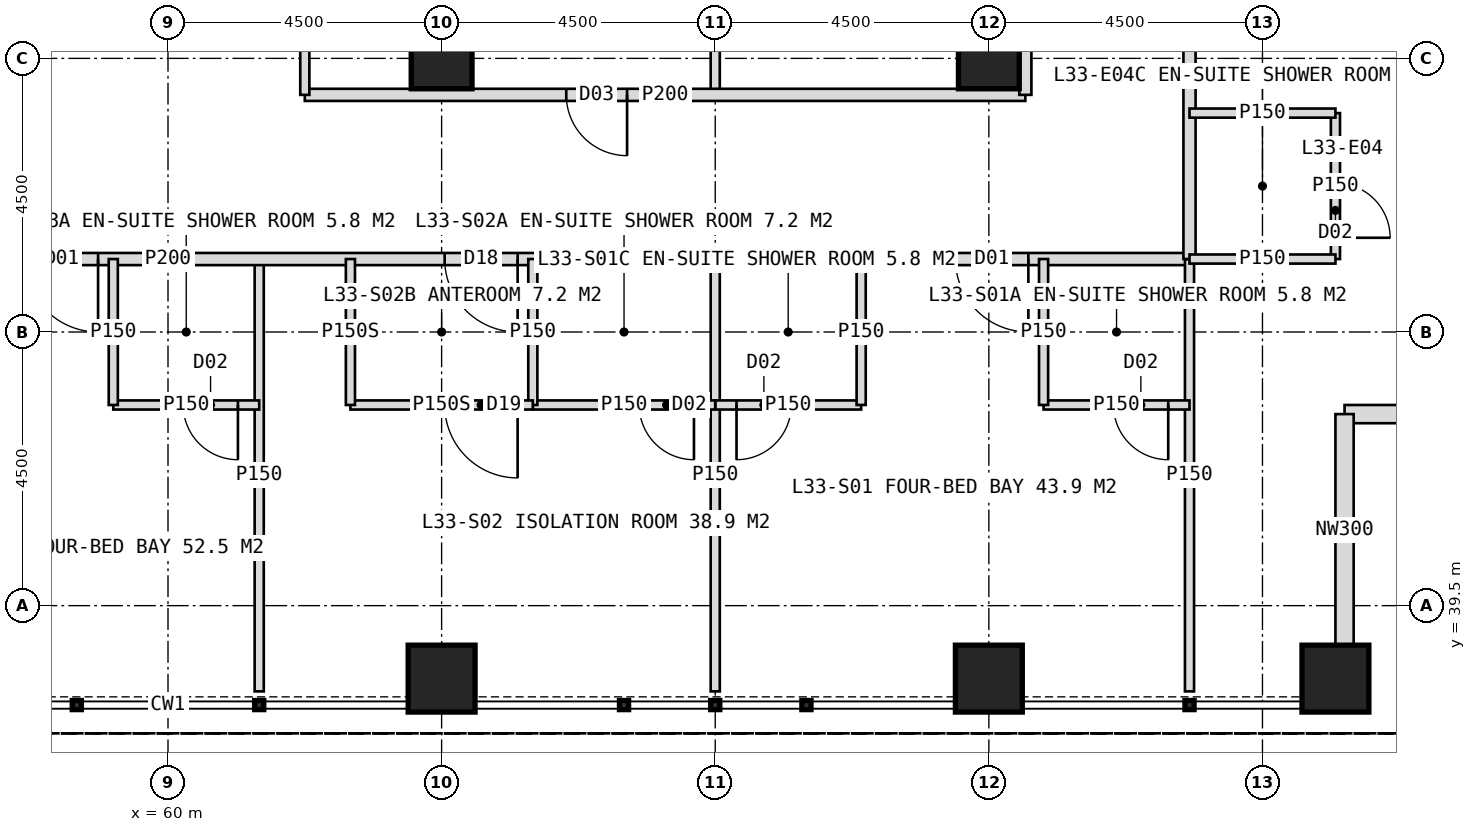
"""IFC4 building model, lengths in metres.
Left out: names, types, materials, properties, quantities, classifications, styles, units other than length and angle.
Written with IfcOpenShell. Run it as: python <this file> out.ifc"""

import sys

from ifc_helpers import new_model, si_unit, direction, frame, frame_2d, origin, origin_2d, place, context, subcontext, project, spatial, rectangle, hollow_rectangle, extrude, element, fill, save


model = new_model("IFC4")
c1 = context("Model", 3, precision=1e-05, world=origin(), true_north=direction((0.0, 1.0)))
c2 = subcontext(c1, "Body", "Model", "MODEL_VIEW")
j1 = project(units=[si_unit("LENGTHUNIT", "METRE"), si_unit("PLANEANGLEUNIT", "RADIAN")], contexts=[c1])
p1 = place(None, origin())
s1 = spatial("IfcSite", under=j1, at=p1, CompositionType="ELEMENT")
p2 = place(p1, origin())
s2 = spatial("IfcBuilding", under=s1, at=p2, CompositionType="ELEMENT")
p3 = place(p2, frame((0.0, 0.0, 140.0)))
s3 = spatial("IfcBuildingStorey", under=s2, at=p3, CompositionType="ELEMENT", Elevation=140.0)
for number, where, z_axis, x_axis in (
    (1, (73.5, 48.5, 0.0), (0.0, 0.0, 1.0), (1.0, 0.0, 0.0)),
    (2, (64.5, 48.5, 0.0), (0.0, 0.0, 1.0), (1.0, 0.0, 0.0)),
):
    element("IfcColumn", number, at=place(p3, frame(where, z_axis=z_axis, x_axis=x_axis)), inside=s3, PredefinedType="COLUMN", context=c2, shape_type="SweptSolid", body=[
        extrude(hollow_rectangle(XDim=1.0, YDim=1.0, WallThickness=0.1, at=origin_2d()), origin(), (0.0, 0.0, 1.0), 4.0),
    ])
for number, where, z_axis, x_axis in (
    (3, (64.5, 38.3, 0.0), (0.0, 0.0, 1.0), (1.0, 0.0, 0.0)),
    (4, (73.5, 38.3, 0.0), (0.0, 0.0, 1.0), (1.0, 0.0, 0.0)),
    (5, (79.2, 38.3, 0.0), (0.0, 0.0, 1.0), (1.0, 0.0, 0.0)),
):
    element("IfcColumn", number, at=place(p3, frame(where, z_axis=z_axis, x_axis=x_axis)), inside=s3, PredefinedType="COLUMN", context=c2, shape_type="SweptSolid", body=[
        extrude(hollow_rectangle(XDim=1.1, YDim=1.1, WallThickness=0.1, at=origin_2d()), origin(), (0.0, 0.0, 1.0), 4.0),
    ])
for number, where, z_axis, x_axis in (
    (6, (83.15, 42.65, 0.0), (0.0, 0.0, 1.0), (-1.0, 0.0, 0.0)),
    (7, (79.35, 42.65, 0.0), (0.0, 0.0, 1.0), (0.0, -1.0, 0.0)),
):
    element("IfcWall", number, at=place(p3, frame(where, z_axis=z_axis, x_axis=x_axis)), inside=s3, PredefinedType="ELEMENTEDWALL", context=c2, shape_type="SweptSolid", body=[
        extrude(rectangle(XDim=3.8, YDim=0.3, at=frame_2d((1.9, 0.0))), origin(), (0.0, 0.0, 1.0), 4.0),
    ])
for number, where, z_axis, x_axis in (
    (8, (69.0, 45.2, 0.0), (0.0, 0.0, 1.0), (0.0, -1.0, 0.0)),
    (9, (61.5, 45.2, 0.0), (0.0, 0.0, 1.0), (0.0, -1.0, 0.0)),
):
    element("IfcWall", number, at=place(p3, frame(where, z_axis=z_axis, x_axis=x_axis)), inside=s3, PredefinedType="PARTITIONING", context=c2, shape_type="SweptSolid", body=[
        extrude(rectangle(XDim=7.11, YDim=0.15, at=frame_2d((3.555, 0.0))), origin(), (0.0, 0.0, 1.0), 3.75),
    ])
p4 = place(p3, frame((76.8, 45.2, 0.0), z_axis=(0.0, 0.0, 1.0), x_axis=(-1.0, 0.0, 0.0)))
e10 = element("IfcWall", 10, at=p4, inside=s3, PredefinedType="PARTITIONING", context=c2, shape_type="SweptSolid", body=[
    extrude(rectangle(XDim=33.6, YDim=0.2, at=frame_2d((16.8, 0.0))), origin(), (0.0, 0.0, 1.0), 3.75),
])
p5 = place(p4, frame((2.65, 0.0, 0.0)))
e11 = element("IfcOpeningElement", 11, at=p5, cuts=e10, PredefinedType="OPENING", context=c2, shape_type="SweptSolid", body=[
    extrude(rectangle(XDim=1.2, YDim=2.2, at=frame_2d((0.6, 1.1))), frame((0.0, 0.11, 0.0), z_axis=(0.0, -1.0, 0.0), x_axis=(1.0, 0.0, 0.0)), (0.0, 0.0, 1.0), 0.22),
])
p6 = place(p4, frame((11.05, 0.0, 0.0)))
e12 = element("IfcOpeningElement", 12, at=p6, cuts=e10, PredefinedType="OPENING", context=c2, shape_type="SweptSolid", body=[
    extrude(rectangle(XDim=1.2, YDim=2.2, at=frame_2d((0.6, 1.1))), frame((0.0, 0.11, 0.0), z_axis=(0.0, -1.0, 0.0), x_axis=(1.0, 0.0, 0.0)), (0.0, 0.0, 1.0), 0.22),
])
p7 = place(p4, frame((17.95, 0.0, 0.0)))
e13 = element("IfcOpeningElement", 13, at=p7, cuts=e10, PredefinedType="OPENING", context=c2, shape_type="SweptSolid", body=[
    extrude(rectangle(XDim=1.2, YDim=2.2, at=frame_2d((0.6, 1.1))), frame((0.0, 0.11, 0.0), z_axis=(0.0, -1.0, 0.0), x_axis=(1.0, 0.0, 0.0)), (0.0, 0.0, 1.0), 0.22),
])
p8 = place(p4, frame((26.95, 0.0, 0.0)))
e14 = element("IfcOpeningElement", 14, at=p8, cuts=e10, PredefinedType="OPENING", context=c2, shape_type="SweptSolid", body=[
    extrude(rectangle(XDim=1.2, YDim=2.2, at=frame_2d((0.6, 1.1))), frame((0.0, 0.11, 0.0), z_axis=(0.0, -1.0, 0.0), x_axis=(1.0, 0.0, 0.0)), (0.0, 0.0, 1.0), 0.22),
])
p9 = place(p3, frame((76.8, 45.2, 0.0), z_axis=(0.0, 0.0, 1.0), x_axis=(0.0, -1.0, 0.0)))
e15 = element("IfcWall", 15, at=p9, inside=s3, PredefinedType="PARTITIONING", context=c2, shape_type="SweptSolid", body=[
    extrude(rectangle(XDim=7.11, YDim=0.15, at=frame_2d((3.555, 0.0))), origin(), (0.0, 0.0, 1.0), 3.75),
])
p10 = place(p3, frame((76.8, 42.8, 0.0), z_axis=(0.0, 0.0, 1.0), x_axis=(-1.0, 0.0, 0.0)))
e16 = element("IfcWall", 16, at=p10, inside=s3, PredefinedType="PARTITIONING", context=c2, shape_type="SweptSolid", body=[
    extrude(rectangle(XDim=2.4, YDim=0.15, at=frame_2d((1.2, 0.0))), origin(), (0.0, 0.0, 1.0), 2.997),
])
p11 = place(p10, frame((0.35, 0.0, 0.0)))
e17 = element("IfcOpeningElement", 17, at=p11, cuts=e16, PredefinedType="OPENING", context=c2, shape_type="SweptSolid", body=[
    extrude(rectangle(XDim=0.9, YDim=2.1, at=frame_2d((0.45, 1.05))), frame((0.0, 0.085, 0.0), z_axis=(0.0, -1.0, 0.0), x_axis=(1.0, 0.0, 0.0)), (0.0, 0.0, 1.0), 0.17),
])
p12 = place(p3, frame((74.4, 45.2, 0.0), z_axis=(0.0, 0.0, 1.0), x_axis=(0.0, -1.0, 0.0)))
e18 = element("IfcWall", 18, at=p12, inside=s3, PredefinedType="PARTITIONING", context=c2, shape_type="SweptSolid", body=[
    extrude(rectangle(XDim=2.4, YDim=0.15, at=frame_2d((1.2, 0.0))), origin(), (0.0, 0.0, 1.0), 3.75),
])
p13 = place(p3, frame((71.4, 42.8, 0.0), z_axis=(0.0, 0.0, 1.0), x_axis=(-1.0, 0.0, 0.0)))
e19 = element("IfcWall", 19, at=p13, inside=s3, PredefinedType="PARTITIONING", context=c2, shape_type="SweptSolid", body=[
    extrude(rectangle(XDim=2.4, YDim=0.15, at=frame_2d((1.2, 0.0))), origin(), (0.0, 0.0, 1.0), 3.75),
])
p14 = place(p13, frame((1.15, 0.0, 0.0)))
e20 = element("IfcOpeningElement", 20, at=p14, cuts=e19, PredefinedType="OPENING", context=c2, shape_type="SweptSolid", body=[
    extrude(rectangle(XDim=0.9, YDim=2.1, at=frame_2d((0.45, 1.05))), frame((0.0, 0.085, 0.0), z_axis=(0.0, -1.0, 0.0), x_axis=(1.0, 0.0, 0.0)), (0.0, 0.0, 1.0), 0.17),
])
p15 = place(p3, frame((71.4, 45.2, 0.0), z_axis=(0.0, 0.0, 1.0), x_axis=(0.0, -1.0, 0.0)))
e21 = element("IfcWall", 21, at=p15, inside=s3, PredefinedType="PARTITIONING", context=c2, shape_type="SweptSolid", body=[
    extrude(rectangle(XDim=2.4, YDim=0.15, at=frame_2d((1.2, 0.0))), origin(), (0.0, 0.0, 1.0), 3.75),
])
p16 = place(p3, frame((69.0, 42.8, 0.0), z_axis=(0.0, 0.0, 1.0), x_axis=(-1.0, 0.0, 0.0)))
e22 = element("IfcWall", 22, at=p16, inside=s3, PredefinedType="PARTITIONING", context=c2, shape_type="SweptSolid", body=[
    extrude(rectangle(XDim=3.0, YDim=0.15, at=frame_2d((1.5, 0.0))), origin(), (0.0, 0.0, 1.0), 3.75),
])
p17 = place(p16, frame((0.35, 0.0, 0.0)))
e23 = element("IfcOpeningElement", 23, at=p17, cuts=e22, PredefinedType="OPENING", context=c2, shape_type="SweptSolid", body=[
    extrude(rectangle(XDim=0.9, YDim=2.1, at=frame_2d((0.45, 1.05))), frame((0.0, 0.085, 0.0), z_axis=(0.0, -1.0, 0.0), x_axis=(1.0, 0.0, 0.0)), (0.0, 0.0, 1.0), 0.17),
])
p18 = place(p3, frame((66.0, 45.2, 0.0), z_axis=(0.0, 0.0, 1.0), x_axis=(0.0, -1.0, 0.0)))
e24 = element("IfcWall", 24, at=p18, inside=s3, PredefinedType="PARTITIONING", context=c2, shape_type="SweptSolid", body=[
    extrude(rectangle(XDim=2.4, YDim=0.15, at=frame_2d((1.2, 0.0))), origin(), (0.0, 0.0, 1.0), 3.75),
])
p19 = place(p3, frame((66.0, 42.8, 0.0), z_axis=(0.0, 0.0, 1.0), x_axis=(-1.0, 0.0, 0.0)))
e25 = element("IfcWall", 25, at=p19, inside=s3, PredefinedType="PARTITIONING", context=c2, shape_type="SweptSolid", body=[
    extrude(rectangle(XDim=3.0, YDim=0.15, at=frame_2d((1.5, 0.0))), origin(), (0.0, 0.0, 1.0), 3.75),
])
p20 = place(p19, frame((0.25, 0.0, 0.0)))
e26 = element("IfcOpeningElement", 26, at=p20, cuts=e25, PredefinedType="OPENING", context=c2, shape_type="SweptSolid", body=[
    extrude(rectangle(XDim=1.2, YDim=2.2, at=frame_2d((0.6, 1.1))), frame((0.0, 0.085, 0.0), z_axis=(0.0, -1.0, 0.0), x_axis=(1.0, 0.0, 0.0)), (0.0, 0.0, 1.0), 0.17),
])
p21 = place(p3, frame((63.0, 45.2, 0.0), z_axis=(0.0, 0.0, 1.0), x_axis=(0.0, -1.0, 0.0)))
e27 = element("IfcWall", 27, at=p21, inside=s3, PredefinedType="PARTITIONING", context=c2, shape_type="SweptSolid", body=[
    extrude(rectangle(XDim=2.4, YDim=0.15, at=frame_2d((1.2, 0.0))), origin(), (0.0, 0.0, 1.0), 3.75),
])
p22 = place(p3, frame((61.5, 42.8, 0.0), z_axis=(0.0, 0.0, 1.0), x_axis=(-1.0, 0.0, 0.0)))
e28 = element("IfcWall", 28, at=p22, inside=s3, PredefinedType="PARTITIONING", context=c2, shape_type="SweptSolid", body=[
    extrude(rectangle(XDim=2.4, YDim=0.15, at=frame_2d((1.2, 0.0))), origin(), (0.0, 0.0, 1.0), 3.75),
])
p23 = place(p22, frame((0.35, 0.0, 0.0)))
e29 = element("IfcOpeningElement", 29, at=p23, cuts=e28, PredefinedType="OPENING", context=c2, shape_type="SweptSolid", body=[
    extrude(rectangle(XDim=0.9, YDim=2.1, at=frame_2d((0.45, 1.05))), frame((0.0, 0.085, 0.0), z_axis=(0.0, -1.0, 0.0), x_axis=(1.0, 0.0, 0.0)), (0.0, 0.0, 1.0), 0.17),
])
p24 = place(p3, frame((59.1, 45.2, 0.0), z_axis=(0.0, 0.0, 1.0), x_axis=(0.0, -1.0, 0.0)))
e30 = element("IfcWall", 30, at=p24, inside=s3, PredefinedType="PARTITIONING", context=c2, shape_type="SweptSolid", body=[
    extrude(rectangle(XDim=2.4, YDim=0.15, at=frame_2d((1.2, 0.0))), origin(), (0.0, 0.0, 1.0), 3.75),
])
p25 = place(p3, frame((69.0, 53.0, 0.0), z_axis=(0.0, 0.0, 1.0), x_axis=(0.0, -1.0, 0.0)))
e31 = element("IfcWall", 31, at=p25, inside=s3, PredefinedType="PARTITIONING", context=c2, shape_type="SweptSolid", body=[
    extrude(rectangle(XDim=5.1, YDim=0.15, at=frame_2d((2.55, 0.0))), origin(), (0.0, 0.0, 1.0), 3.75),
])
p26 = place(p3, frame((74.1, 47.9, 0.0), z_axis=(0.0, 0.0, 1.0), x_axis=(-1.0, 0.0, 0.0)))
e32 = element("IfcWall", 32, at=p26, inside=s3, PredefinedType="PARTITIONING", context=c2, shape_type="SweptSolid", body=[
    extrude(rectangle(XDim=11.85, YDim=0.2, at=frame_2d((5.925, 0.0))), origin(), (0.0, 0.0, 1.0), 3.75),
])
p27 = place(p26, frame((6.55, 0.0, 0.0)))
e33 = element("IfcOpeningElement", 33, at=p27, cuts=e32, PredefinedType="OPENING", context=c2, shape_type="SweptSolid", body=[
    extrude(rectangle(XDim=1.0, YDim=2.1, at=frame_2d((0.5, 1.05))), frame((0.0, 0.11, 0.0), z_axis=(0.0, -1.0, 0.0), x_axis=(1.0, 0.0, 0.0)), (0.0, 0.0, 1.0), 0.22),
])
p28 = place(p3, frame((62.25, 53.0, 0.0), z_axis=(0.0, 0.0, 1.0), x_axis=(0.0, -1.0, 0.0)))
e34 = element("IfcWall", 34, at=p28, inside=s3, PredefinedType="PARTITIONING", context=c2, shape_type="SweptSolid", body=[
    extrude(rectangle(XDim=5.1, YDim=0.15, at=frame_2d((2.55, 0.0))), origin(), (0.0, 0.0, 1.0), 3.75),
])
p29 = place(p3, frame((76.8, 78.8, 0.0), z_axis=(0.0, 0.0, 1.0), x_axis=(0.0, -1.0, 0.0)))
e35 = element("IfcWall", 35, at=p29, inside=s3, PredefinedType="PARTITIONING", context=c2, shape_type="SweptSolid", body=[
    extrude(rectangle(XDim=33.6, YDim=0.2, at=frame_2d((16.8, 0.0))), origin(), (0.0, 0.0, 1.0), 3.75),
])
p30 = place(p29, frame((2.65, 0.0, 0.0)))
e36 = element("IfcOpeningElement", 36, at=p30, cuts=e35, PredefinedType="OPENING", context=c2, shape_type="SweptSolid", body=[
    extrude(rectangle(XDim=1.2, YDim=2.2, at=frame_2d((0.6, 1.1))), frame((0.0, 0.11, 0.0), z_axis=(0.0, -1.0, 0.0), x_axis=(1.0, 0.0, 0.0)), (0.0, 0.0, 1.0), 0.22),
])
p31 = place(p29, frame((8.95, 0.0, 0.0)))
e37 = element("IfcOpeningElement", 37, at=p31, cuts=e35, PredefinedType="OPENING", context=c2, shape_type="SweptSolid", body=[
    extrude(rectangle(XDim=1.2, YDim=2.2, at=frame_2d((0.6, 1.1))), frame((0.0, 0.11, 0.0), z_axis=(0.0, -1.0, 0.0), x_axis=(1.0, 0.0, 0.0)), (0.0, 0.0, 1.0), 0.22),
])
p32 = place(p29, frame((19.45, 0.0, 0.0)))
e38 = element("IfcOpeningElement", 38, at=p32, cuts=e35, PredefinedType="OPENING", context=c2, shape_type="SweptSolid", body=[
    extrude(rectangle(XDim=1.2, YDim=2.2, at=frame_2d((0.6, 1.1))), frame((0.0, 0.11, 0.0), z_axis=(0.0, -1.0, 0.0), x_axis=(1.0, 0.0, 0.0)), (0.0, 0.0, 1.0), 0.22),
])
p33 = place(p29, frame((28.45, 0.0, 0.0)))
e39 = element("IfcOpeningElement", 39, at=p33, cuts=e35, PredefinedType="OPENING", context=c2, shape_type="SweptSolid", body=[
    extrude(rectangle(XDim=1.2, YDim=2.2, at=frame_2d((0.6, 1.1))), frame((0.0, 0.11, 0.0), z_axis=(0.0, -1.0, 0.0), x_axis=(1.0, 0.0, 0.0)), (0.0, 0.0, 1.0), 0.22),
])
p34 = place(p3, frame((79.2, 47.6, 0.0), z_axis=(0.0, 0.0, 1.0), x_axis=(0.0, -1.0, 0.0)))
e40 = element("IfcWall", 40, at=p34, inside=s3, PredefinedType="PARTITIONING", context=c2, shape_type="SweptSolid", body=[
    extrude(rectangle(XDim=2.4, YDim=0.15, at=frame_2d((1.2, 0.0))), origin(), (0.0, 0.0, 1.0), 2.997),
])
p35 = place(p34, frame((1.15, 0.0, 0.0)))
e41 = element("IfcOpeningElement", 41, at=p35, cuts=e40, PredefinedType="OPENING", context=c2, shape_type="SweptSolid", body=[
    extrude(rectangle(XDim=0.9, YDim=2.1, at=frame_2d((0.45, 1.05))), frame((0.0, 0.085, 0.0), z_axis=(0.0, -1.0, 0.0), x_axis=(1.0, 0.0, 0.0)), (0.0, 0.0, 1.0), 0.17),
])
for number, where, z_axis, x_axis in (
    (42, (76.8, 47.6, 0.0), (0.0, 0.0, 1.0), (1.0, 0.0, 0.0)),
    (43, (76.8, 45.2, 0.0), (0.0, 0.0, 1.0), (1.0, 0.0, 0.0)),
):
    element("IfcWall", number, at=place(p3, frame(where, z_axis=z_axis, x_axis=x_axis)), inside=s3, PredefinedType="PARTITIONING", context=c2, shape_type="SweptSolid", body=[
        extrude(rectangle(XDim=2.4, YDim=0.15, at=frame_2d((1.2, 0.0))), origin(), (0.0, 0.0, 1.0), 3.75),
    ])
p36 = place(p3, frame((74.1, 62.0, 0.0), z_axis=(0.0, 0.0, 1.0), x_axis=(0.0, -1.0, 0.0)))
e44 = element("IfcWall", 44, at=p36, inside=s3, PredefinedType="PARTITIONING", context=c2, shape_type="SweptSolid", body=[
    extrude(rectangle(XDim=14.1, YDim=0.2, at=frame_2d((7.05, 0.0))), origin(), (0.0, 0.0, 1.0), 3.75),
])
p37 = place(p36, frame((2.5, 0.0, 0.0)))
e45 = element("IfcOpeningElement", 45, at=p37, cuts=e44, PredefinedType="OPENING", context=c2, shape_type="SweptSolid", body=[
    extrude(rectangle(XDim=1.0, YDim=2.1, at=frame_2d((0.5, 1.05))), frame((0.0, 0.11, 0.0), z_axis=(0.0, -1.0, 0.0), x_axis=(1.0, 0.0, 0.0)), (0.0, 0.0, 1.0), 0.22),
])
p38 = place(p36, frame((7.75, 0.0, 0.0)))
e46 = element("IfcOpeningElement", 46, at=p38, cuts=e44, PredefinedType="OPENING", context=c2, shape_type="SweptSolid", body=[
    extrude(rectangle(XDim=1.0, YDim=2.1, at=frame_2d((0.5, 1.05))), frame((0.0, 0.11, 0.0), z_axis=(0.0, -1.0, 0.0), x_axis=(1.0, 0.0, 0.0)), (0.0, 0.0, 1.0), 0.22),
])
p39 = place(p36, frame((11.2, 0.0, 0.0)))
e47 = element("IfcOpeningElement", 47, at=p39, cuts=e44, PredefinedType="OPENING", context=c2, shape_type="SweptSolid", body=[
    extrude(rectangle(XDim=1.0, YDim=2.1, at=frame_2d((0.5, 1.05))), frame((0.0, 0.11, 0.0), z_axis=(0.0, -1.0, 0.0), x_axis=(1.0, 0.0, 0.0)), (0.0, 0.0, 1.0), 0.22),
])
p40 = place(p5, origin())
e48 = element("IfcDoor", 48, at=p40, inside=s3, OperationType="SINGLE_SWING_LEFT", PredefinedType="DOOR", context=c2, shape_type="SweptSolid", body=[
    extrude(rectangle(XDim=1.2, YDim=2.2, at=frame_2d((0.6, 1.1))), frame((0.0, 0.025, 0.0), z_axis=(0.0, -1.0, 0.0), x_axis=(1.0, 0.0, 0.0)), (0.0, 0.0, 1.0), 0.05),
])
fill(e11, e48)
p41 = place(p11, origin())
e49 = element("IfcDoor", 49, at=p41, inside=s3, OperationType="SINGLE_SWING_LEFT", PredefinedType="DOOR", context=c2, shape_type="SweptSolid", body=[
    extrude(rectangle(XDim=0.9, YDim=2.1, at=frame_2d((0.45, 1.05))), frame((0.0, 0.025, 0.0), z_axis=(0.0, -1.0, 0.0), x_axis=(1.0, 0.0, 0.0)), (0.0, 0.0, 1.0), 0.05),
])
fill(e17, e49)
p42 = place(p14, origin())
e50 = element("IfcDoor", 50, at=p42, inside=s3, OperationType="SINGLE_SWING_RIGHT", PredefinedType="DOOR", context=c2, shape_type="SweptSolid", body=[
    extrude(rectangle(XDim=0.9, YDim=2.1, at=frame_2d((0.45, 1.05))), frame((0.0, 0.025, 0.0), z_axis=(0.0, -1.0, 0.0), x_axis=(1.0, 0.0, 0.0)), (0.0, 0.0, 1.0), 0.05),
])
fill(e20, e50)
p43 = place(p20, origin())
e51 = element("IfcDoor", 51, at=p43, inside=s3, OperationType="SINGLE_SWING_LEFT", PredefinedType="DOOR", context=c2, shape_type="SweptSolid", body=[
    extrude(rectangle(XDim=1.2, YDim=2.2, at=frame_2d((0.6, 1.1))), frame((0.0, 0.025, 0.0), z_axis=(0.0, -1.0, 0.0), x_axis=(1.0, 0.0, 0.0)), (0.0, 0.0, 1.0), 0.05),
])
fill(e26, e51)
p44 = place(p6, origin())
e52 = element("IfcDoor", 52, at=p44, inside=s3, OperationType="SINGLE_SWING_LEFT", PredefinedType="DOOR", context=c2, shape_type="SweptSolid", body=[
    extrude(rectangle(XDim=1.2, YDim=2.2, at=frame_2d((0.6, 1.1))), frame((0.0, 0.025, 0.0), z_axis=(0.0, -1.0, 0.0), x_axis=(1.0, 0.0, 0.0)), (0.0, 0.0, 1.0), 0.05),
])
fill(e12, e52)
p45 = place(p17, origin())
e53 = element("IfcDoor", 53, at=p45, inside=s3, OperationType="SINGLE_SWING_LEFT", PredefinedType="DOOR", context=c2, shape_type="SweptSolid", body=[
    extrude(rectangle(XDim=0.9, YDim=2.1, at=frame_2d((0.45, 1.05))), frame((0.0, 0.025, 0.0), z_axis=(0.0, -1.0, 0.0), x_axis=(1.0, 0.0, 0.0)), (0.0, 0.0, 1.0), 0.05),
])
fill(e23, e53)
p46 = place(p7, origin())
e54 = element("IfcDoor", 54, at=p46, inside=s3, OperationType="SINGLE_SWING_LEFT", PredefinedType="DOOR", context=c2, shape_type="SweptSolid", body=[
    extrude(rectangle(XDim=1.2, YDim=2.2, at=frame_2d((0.6, 1.1))), frame((0.0, 0.025, 0.0), z_axis=(0.0, -1.0, 0.0), x_axis=(1.0, 0.0, 0.0)), (0.0, 0.0, 1.0), 0.05),
])
fill(e13, e54)
p47 = place(p23, origin())
e55 = element("IfcDoor", 55, at=p47, inside=s3, OperationType="SINGLE_SWING_LEFT", PredefinedType="DOOR", context=c2, shape_type="SweptSolid", body=[
    extrude(rectangle(XDim=0.9, YDim=2.1, at=frame_2d((0.45, 1.05))), frame((0.0, 0.025, 0.0), z_axis=(0.0, -1.0, 0.0), x_axis=(1.0, 0.0, 0.0)), (0.0, 0.0, 1.0), 0.05),
])
fill(e29, e55)
p48 = place(p27, origin())
e56 = element("IfcDoor", 56, at=p48, inside=s3, OperationType="SINGLE_SWING_LEFT", PredefinedType="DOOR", context=c2, shape_type="SweptSolid", body=[
    extrude(rectangle(XDim=1.0, YDim=2.1, at=frame_2d((0.5, 1.05))), frame((0.0, 0.025, 0.0), z_axis=(0.0, -1.0, 0.0), x_axis=(1.0, 0.0, 0.0)), (0.0, 0.0, 1.0), 0.05),
])
fill(e33, e56)
p49 = place(p35, origin())
e57 = element("IfcDoor", 57, at=p49, inside=s3, OperationType="SINGLE_SWING_RIGHT", PredefinedType="DOOR", context=c2, shape_type="SweptSolid", body=[
    extrude(rectangle(XDim=0.9, YDim=2.1, at=frame_2d((0.45, 1.05))), frame((0.0, 0.025, 0.0), z_axis=(0.0, -1.0, 0.0), x_axis=(1.0, 0.0, 0.0)), (0.0, 0.0, 1.0), 0.05),
])
fill(e41, e57)
save(model, sys.argv[1])
